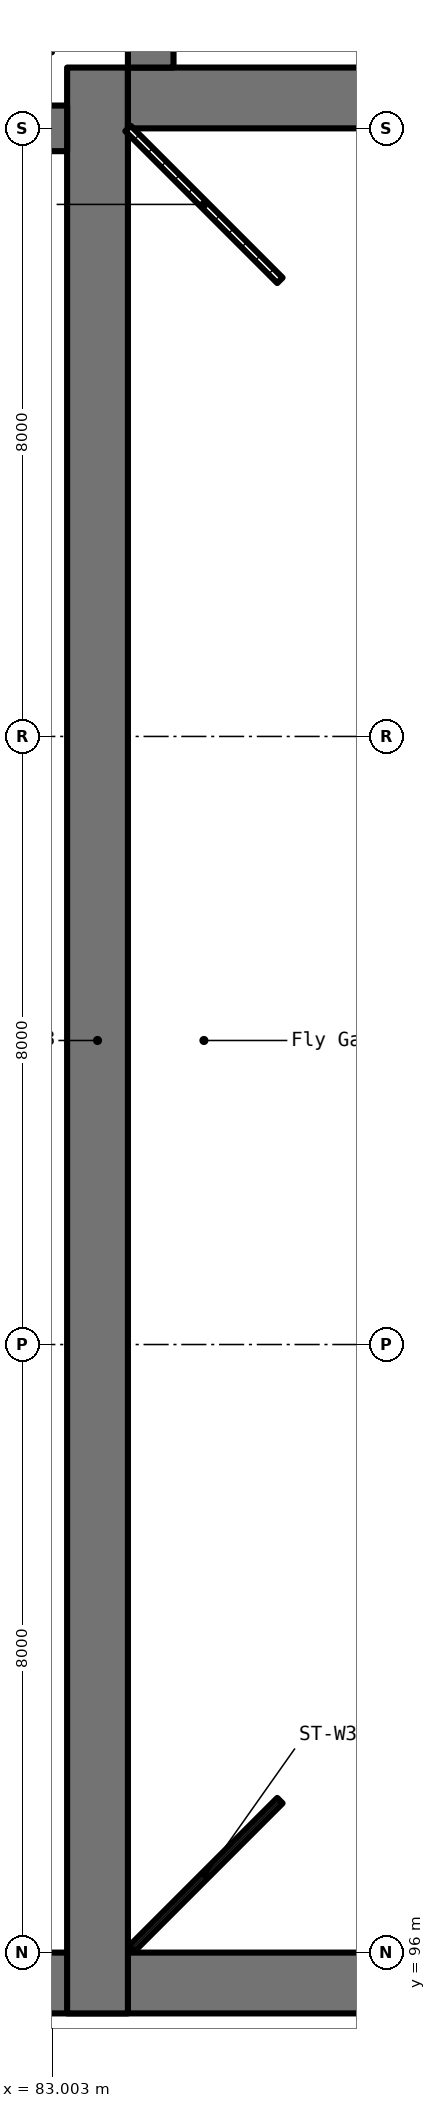
"""IFC4 building model, lengths in metres.
Left out: names, types, materials, properties, quantities, classifications, styles, units other than length and angle.
Written with IfcOpenShell. Run it as: python <this file> out.ifc"""

import sys

from ifc_helpers import new_model, si_unit, direction, frame, frame_2d, origin, place, context, subcontext, project, spatial, rectangle, extrude, element, save


model = new_model("IFC4")
c1 = context("Model", 3, precision=1e-05, world=origin(), true_north=direction((0.0, 1.0)))
c2 = subcontext(c1, "Body", "Model", "MODEL_VIEW")
j1 = project(units=[si_unit("LENGTHUNIT", "METRE"), si_unit("PLANEANGLEUNIT", "RADIAN")], contexts=[c1])
p1 = place(None, origin())
s1 = spatial("IfcSite", under=j1, at=p1, CompositionType="ELEMENT")
p2 = place(p1, origin())
s2 = spatial("IfcBuilding", under=s1, at=p2, CompositionType="ELEMENT")
p3 = place(p2, frame((0.0, 0.0, 17.0)))
s3 = spatial("IfcBuildingStorey", under=s2, at=p3, CompositionType="ELEMENT", Elevation=17.0)
p4 = place(p3, frame((76.0, 95.6, 0.0), z_axis=(0.0, 0.0, 1.0), x_axis=(1.0, 0.0, 0.0)))
e1 = element("IfcWall", 1, at=p4, inside=s3, PredefinedType="SHEAR", context=c2, shape_type="SweptSolid", body=[
    extrude(rectangle(XDim=40.0, YDim=0.8, at=frame_2d((20.0, 0.0))), origin(), (0.0, 0.0, 1.0), 5.5),
])
p5 = place(p3, frame((83.6, 95.2, 0.0), z_axis=(0.0, 0.0, 1.0), x_axis=(0.0, 1.0, 0.0)))
e2 = element("IfcWall", 2, at=p5, inside=s3, PredefinedType="SHEAR", context=c2, shape_type="SweptSolid", body=[
    extrude(rectangle(XDim=25.6, YDim=0.8, at=frame_2d((12.8, 0.0))), origin(), (0.0, 0.0, 1.0), 5.5),
])
p6 = place(p3, frame((84.0, 120.4, 0.0), z_axis=(0.0, 0.0, 1.0), x_axis=(1.0, 0.0, 0.0)))
e3 = element("IfcWall", 3, at=p6, inside=s3, PredefinedType="SHEAR", context=c2, shape_type="SweptSolid", body=[
    extrude(rectangle(XDim=24.0, YDim=0.8, at=frame_2d((12.0, 0.0))), origin(), (0.0, 0.0, 1.0), 5.5),
])
p7 = place(p3, frame((60.6, 120.0, 0.0), z_axis=(0.0, 0.0, 1.0), x_axis=(1.0, 0.0, 0.0)))
e4 = element("IfcWall", 4, at=p7, inside=s3, PredefinedType="SHEAR", context=c2, shape_type="SweptSolid", body=[
    extrude(rectangle(XDim=22.6, YDim=0.6, at=frame_2d((11.3, 0.0))), origin(), (0.0, 0.0, 1.0), 2.88),
])
p8 = place(p7, frame((4.917, 0.0, 1.4)))
e5 = element("IfcOpeningElement", 5, at=p8, cuts=e4, PredefinedType="OPENING", context=c2, shape_type="SweptSolid", body=[
    extrude(rectangle(XDim=1.5, YDim=1.0, at=frame_2d((0.75, 0.5))), frame((0.0, 0.312, 0.0), z_axis=(0.0, -1.0, 0.0), x_axis=(1.0, 0.0, 0.0)), (0.0, 0.0, 1.0), 0.624),
])
p9 = place(p7, frame((10.55, 0.0, 1.4)))
e6 = element("IfcOpeningElement", 6, at=p9, cuts=e4, PredefinedType="OPENING", context=c2, shape_type="SweptSolid", body=[
    extrude(rectangle(XDim=1.5, YDim=1.0, at=frame_2d((0.75, 0.5))), frame((0.0, 0.312, 0.0), z_axis=(0.0, -1.0, 0.0), x_axis=(1.0, 0.0, 0.0)), (0.0, 0.0, 1.0), 0.624),
])
p10 = place(p7, frame((16.183, 0.0, 1.4)))
e7 = element("IfcOpeningElement", 7, at=p10, cuts=e4, PredefinedType="OPENING", context=c2, shape_type="SweptSolid", body=[
    extrude(rectangle(XDim=1.5, YDim=1.0, at=frame_2d((0.75, 0.5))), frame((0.0, 0.312, 0.0), z_axis=(0.0, -1.0, 0.0), x_axis=(1.0, 0.0, 0.0)), (0.0, 0.0, 1.0), 0.624),
])
p11 = place(p3, frame((84.3, 120.8, 0.0), z_axis=(0.0, 0.0, 1.0), x_axis=(0.0, 1.0, 0.0)))
e8 = element("IfcWall", 8, at=p11, inside=s3, PredefinedType="SHEAR", context=c2, shape_type="SweptSolid", body=[
    extrude(rectangle(XDim=15.2, YDim=0.6, at=frame_2d((7.6, 0.0))), origin(), (0.0, 0.0, 1.0), 5.5),
])
p12 = place(p11, frame((2.6, 0.0, 1.4)))
e9 = element("IfcOpeningElement", 9, at=p12, cuts=e8, PredefinedType="OPENING", context=c2, shape_type="SweptSolid", body=[
    extrude(rectangle(XDim=2.4, YDim=1.0, at=frame_2d((1.2, 0.5))), frame((0.0, 0.312, 0.0), z_axis=(0.0, -1.0, 0.0), x_axis=(1.0, 0.0, 0.0)), (0.0, 0.0, 1.0), 0.624),
])
p13 = place(p11, frame((10.2, 0.0, 1.4)))
e10 = element("IfcOpeningElement", 10, at=p13, cuts=e8, PredefinedType="OPENING", context=c2, shape_type="SweptSolid", body=[
    extrude(rectangle(XDim=2.4, YDim=1.0, at=frame_2d((1.2, 0.5))), frame((0.0, 0.312, 0.0), z_axis=(0.0, -1.0, 0.0), x_axis=(1.0, 0.0, 0.0)), (0.0, 0.0, 1.0), 0.624),
])
p14 = place(p3, frame((84.001, 119.999, 0.0), z_axis=(0.0, 0.0, 1.0), x_axis=(0.707106781187, -0.707106781187, 0.0)))
e11 = element("IfcWall", 11, at=p14, inside=s3, PredefinedType="PARTITIONING", context=c2, shape_type="SweptSolid", body=[
    extrude(rectangle(XDim=2.827, YDim=0.1, at=frame_2d((1.414, 0.0))), origin(), (0.0, 0.0, 1.0), 4.6),
])
p15 = place(p3, frame((86.0, 98.0, 0.0), z_axis=(0.0, 0.0, 1.0), x_axis=(-0.707106781187, -0.707106781187, 0.0)))
e12 = element("IfcWall", 12, at=p15, inside=s3, PredefinedType="PARTITIONING", context=c2, shape_type="SweptSolid", body=[
    extrude(rectangle(XDim=2.758, YDim=0.1, at=frame_2d((1.379, 0.0))), origin(), (0.0, 0.0, 1.0), 4.6),
])
save(model, sys.argv[1])
